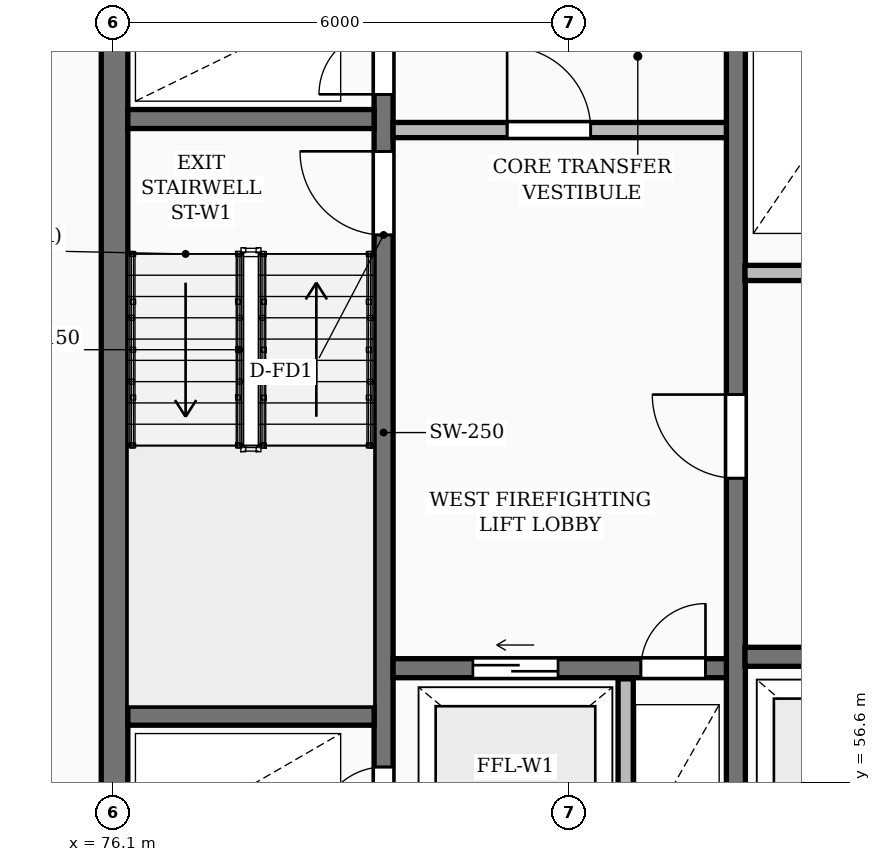
"""IFC4 building model, lengths in metres.
Left out: names, types, materials, properties, quantities, classifications, styles, units other than length and angle.
Written with IfcOpenShell. Run it as: python <this file> out.ifc"""

import sys

from ifc_helpers import new_model, si_unit, direction, frame, frame_2d, origin, place, context, subcontext, project, spatial, rectangle, extrude, element, fill, save


model = new_model("IFC4")
c1 = context("Model", 3, precision=1e-05, world=origin(), true_north=direction((0.0, 1.0)))
c2 = subcontext(c1, "Body", "Model", "MODEL_VIEW")
j1 = project(units=[si_unit("LENGTHUNIT", "METRE"), si_unit("PLANEANGLEUNIT", "RADIAN")], contexts=[c1])
p1 = place(None, origin())
s1 = spatial("IfcSite", under=j1, at=p1, CompositionType="ELEMENT")
p2 = place(p1, origin())
s2 = spatial("IfcBuilding", under=s1, at=p2, CompositionType="ELEMENT")
p3 = place(p2, frame((0.0, 0.0, -7.2)))
s3 = spatial("IfcBuildingStorey", under=s2, at=p3, CompositionType="ELEMENT", Elevation=-7.2)
p4 = place(p3, frame((76.125, 55.375, 0.0), z_axis=(0.0, 0.0, 1.0), x_axis=(0.0, 1.0, 0.0)))
e1 = element("IfcWall", 1, at=p4, inside=s3, PredefinedType="SHEAR", context=c2, shape_type="SweptSolid", body=[
    extrude(rectangle(XDim=11.65, YDim=0.35, at=frame_2d((5.825, 0.0))), origin(), (0.0, 0.0, 1.0), 3.6),
])
p5 = place(p3, frame((79.665, 55.4, 0.0), z_axis=(0.0, 0.0, 1.0), x_axis=(0.0, 1.0, 0.0)))
e2 = element("IfcWall", 2, at=p5, inside=s3, PredefinedType="SHEAR", context=c2, shape_type="SweptSolid", body=[
    extrude(rectangle(XDim=11.6, YDim=0.25, at=frame_2d((5.8, 0.0))), origin(), (0.0, 0.0, 1.0), 3.6),
])
p6 = place(p5, frame((0.55, 0.0, 0.0)))
e3 = element("IfcOpeningElement", 3, at=p6, cuts=e2, PredefinedType="OPENING", context=c2, shape_type="SweptSolid", body=[
    extrude(rectangle(XDim=0.85, YDim=2.05, at=frame_2d((0.425, 1.025))), frame((0.0, 0.135, 0.0), z_axis=(0.0, -1.0, 0.0), x_axis=(1.0, 0.0, 0.0)), (0.0, 0.0, 1.0), 0.27),
])
p7 = place(p5, frame((8.4, 0.0, 0.0)))
e4 = element("IfcOpeningElement", 4, at=p7, cuts=e2, PredefinedType="OPENING", context=c2, shape_type="SweptSolid", body=[
    extrude(rectangle(XDim=1.1, YDim=2.1, at=frame_2d((0.55, 1.05))), frame((0.0, 0.135, 0.0), z_axis=(0.0, -1.0, 0.0), x_axis=(1.0, 0.0, 0.0)), (0.0, 0.0, 1.0), 0.27),
])
p8 = place(p5, frame((10.25, 0.0, 0.0)))
e5 = element("IfcOpeningElement", 5, at=p8, cuts=e2, PredefinedType="OPENING", context=c2, shape_type="SweptSolid", body=[
    extrude(rectangle(XDim=0.85, YDim=2.05, at=frame_2d((0.425, 1.025))), frame((0.0, 0.135, 0.0), z_axis=(0.0, -1.0, 0.0), x_axis=(1.0, 0.0, 0.0)), (0.0, 0.0, 1.0), 0.27),
])
for number, where, z_axis, x_axis in (
    (6, (76.3, 57.475, 0.0), (0.0, 0.0, 1.0), (1.0, 0.0, 0.0)),
    (7, (76.3, 65.325, 0.0), (0.0, 0.0, 1.0), (1.0, 0.0, 0.0)),
):
    element("IfcWall", number, at=place(p3, frame(where, z_axis=z_axis, x_axis=x_axis)), inside=s3, PredefinedType="SHEAR", context=c2, shape_type="SweptSolid", body=[
        extrude(rectangle(XDim=3.24, YDim=0.25, at=frame_2d((1.62, 0.0))), origin(), (0.0, 0.0, 1.0), 3.6),
    ])
p9 = place(p3, frame((79.79, 58.1, 0.0), z_axis=(0.0, 0.0, 1.0), x_axis=(1.0, 0.0, 0.0)))
e8 = element("IfcWall", 8, at=p9, inside=s3, PredefinedType="SHEAR", context=c2, shape_type="SweptSolid", body=[
    extrude(rectangle(XDim=4.39, YDim=0.25, at=frame_2d((2.195, 0.0))), origin(), (0.0, 0.0, 1.0), 3.6),
])
p10 = place(p9, frame((1.05, 0.0, 0.0)))
e9 = element("IfcOpeningElement", 9, at=p10, cuts=e8, PredefinedType="OPENING", context=c2, shape_type="SweptSolid", body=[
    extrude(rectangle(XDim=1.12, YDim=2.12, at=frame_2d((0.56, 1.06))), frame((0.0, 0.135, 0.0), z_axis=(0.0, -1.0, 0.0), x_axis=(1.0, 0.0, 0.0)), (0.0, 0.0, 1.0), 0.27),
])
p11 = place(p9, frame((3.26, 0.0, 0.0)))
e10 = element("IfcOpeningElement", 10, at=p11, cuts=e8, PredefinedType="OPENING", context=c2, shape_type="SweptSolid", body=[
    extrude(rectangle(XDim=0.85, YDim=2.05, at=frame_2d((0.425, 1.025))), frame((0.0, 0.135, 0.0), z_axis=(0.0, -1.0, 0.0), x_axis=(1.0, 0.0, 0.0)), (0.0, 0.0, 1.0), 0.27),
])
p12 = place(p3, frame((82.85, 55.4, 0.0), z_axis=(0.0, 0.0, 1.0), x_axis=(0.0, 1.0, 0.0)))
e11 = element("IfcWall", 11, at=p12, inside=s3, PredefinedType="PARTITIONING", context=c2, shape_type="SweptSolid", body=[
    extrude(rectangle(XDim=2.56, YDim=0.2, at=frame_2d((1.28, 0.0))), origin(), (0.0, 0.0, 1.0), 3.3),
])
p13 = place(p3, frame((79.79, 65.18, 0.0), z_axis=(0.0, 0.0, 1.0), x_axis=(1.0, 0.0, 0.0)))
e12 = element("IfcWall", 12, at=p13, inside=s3, PredefinedType="PARTITIONING", context=c2, shape_type="SweptSolid", body=[
    extrude(rectangle(XDim=4.39, YDim=0.2, at=frame_2d((2.195, 0.0))), origin(), (0.0, 0.0, 1.0), 3.3),
])
p14 = place(p13, frame((1.5, 0.0, 0.0)))
e13 = element("IfcOpeningElement", 13, at=p14, cuts=e12, PredefinedType="OPENING", context=c2, shape_type="SweptSolid", body=[
    extrude(rectangle(XDim=1.1, YDim=2.1, at=frame_2d((0.55, 1.05))), frame((0.0, 0.11, 0.0), z_axis=(0.0, -1.0, 0.0), x_axis=(1.0, 0.0, 0.0)), (0.0, 0.0, 1.0), 0.22),
])
p15 = place(p3, frame((84.3, 55.4, 0.0), z_axis=(0.0, 0.0, 1.0), x_axis=(0.0, 1.0, 0.0)))
e14 = element("IfcWall", 14, at=p15, inside=s3, PredefinedType="SHEAR", context=c2, shape_type="SweptSolid", body=[
    extrude(rectangle(XDim=11.6, YDim=0.25, at=frame_2d((5.8, 0.0))), origin(), (0.0, 0.0, 1.0), 3.6),
])
p16 = place(p15, frame((5.2, 0.0, 0.0)))
e15 = element("IfcOpeningElement", 15, at=p16, cuts=e14, PredefinedType="OPENING", context=c2, shape_type="SweptSolid", body=[
    extrude(rectangle(XDim=1.1, YDim=2.1, at=frame_2d((0.55, 1.05))), frame((0.0, 0.135, 0.0), z_axis=(0.0, -1.0, 0.0), x_axis=(1.0, 0.0, 0.0)), (0.0, 0.0, 1.0), 0.27),
])
p17 = place(p3, frame((84.42, 58.25, 0.0), z_axis=(0.0, 0.0, 1.0), x_axis=(1.0, 0.0, 0.0)))
e16 = element("IfcWall", 16, at=p17, inside=s3, PredefinedType="SHEAR", context=c2, shape_type="SweptSolid", body=[
    extrude(rectangle(XDim=8.36, YDim=0.25, at=frame_2d((4.18, 0.0))), origin(), (0.0, 0.0, 1.0), 3.6),
])
p18 = place(p17, frame((0.82, 0.0, 0.0)))
e17 = element("IfcOpeningElement", 17, at=p18, cuts=e16, PredefinedType="OPENING", context=c2, shape_type="SweptSolid", body=[
    extrude(rectangle(XDim=1.12, YDim=2.12, at=frame_2d((0.56, 1.06))), frame((0.0, 0.135, 0.0), z_axis=(0.0, -1.0, 0.0), x_axis=(1.0, 0.0, 0.0)), (0.0, 0.0, 1.0), 0.27),
])
p19 = place(p17, frame((3.62, 0.0, 0.0)))
e18 = element("IfcOpeningElement", 18, at=p19, cuts=e16, PredefinedType="OPENING", context=c2, shape_type="SweptSolid", body=[
    extrude(rectangle(XDim=1.12, YDim=2.12, at=frame_2d((0.56, 1.06))), frame((0.0, 0.135, 0.0), z_axis=(0.0, -1.0, 0.0), x_axis=(1.0, 0.0, 0.0)), (0.0, 0.0, 1.0), 0.27),
])
p20 = place(p17, frame((6.42, 0.0, 0.0)))
e19 = element("IfcOpeningElement", 19, at=p20, cuts=e16, PredefinedType="OPENING", context=c2, shape_type="SweptSolid", body=[
    extrude(rectangle(XDim=1.12, YDim=2.12, at=frame_2d((0.56, 1.06))), frame((0.0, 0.135, 0.0), z_axis=(0.0, -1.0, 0.0), x_axis=(1.0, 0.0, 0.0)), (0.0, 0.0, 1.0), 0.27),
])
p21 = place(p3, frame((84.42, 63.3, 0.0), z_axis=(0.0, 0.0, 1.0), x_axis=(1.0, 0.0, 0.0)))
e20 = element("IfcWall", 20, at=p21, inside=s3, PredefinedType="PARTITIONING", context=c2, shape_type="SweptSolid", body=[
    extrude(rectangle(XDim=19.83, YDim=0.2, at=frame_2d((9.915, 0.0))), origin(), (0.0, 0.0, 1.0), 3.3),
])
p22 = place(p21, frame((1.15, 0.0, 0.0)))
e21 = element("IfcOpeningElement", 21, at=p22, cuts=e20, PredefinedType="OPENING", context=c2, shape_type="SweptSolid", body=[
    extrude(rectangle(XDim=0.85, YDim=2.05, at=frame_2d((0.425, 1.025))), frame((0.0, 0.11, 0.0), z_axis=(0.0, -1.0, 0.0), x_axis=(1.0, 0.0, 0.0)), (0.0, 0.0, 1.0), 0.22),
])
p23 = place(p21, frame((3.25, 0.0, 0.0)))
e22 = element("IfcOpeningElement", 22, at=p23, cuts=e20, PredefinedType="OPENING", context=c2, shape_type="SweptSolid", body=[
    extrude(rectangle(XDim=0.85, YDim=2.05, at=frame_2d((0.425, 1.025))), frame((0.0, 0.11, 0.0), z_axis=(0.0, -1.0, 0.0), x_axis=(1.0, 0.0, 0.0)), (0.0, 0.0, 1.0), 0.22),
])
p24 = place(p21, frame((13.08, 0.0, 0.0)))
e23 = element("IfcOpeningElement", 23, at=p24, cuts=e20, PredefinedType="OPENING", context=c2, shape_type="SweptSolid", body=[
    extrude(rectangle(XDim=1.5, YDim=2.2, at=frame_2d((0.75, 1.1))), frame((0.0, 0.11, 0.0), z_axis=(0.0, -1.0, 0.0), x_axis=(1.0, 0.0, 0.0)), (0.0, 0.0, 1.0), 0.22),
])
p25 = place(p21, frame((5.53, 0.0, 0.0)))
e24 = element("IfcOpeningElement", 24, at=p25, cuts=e20, PredefinedType="OPENING", context=c2, shape_type="SweptSolid", body=[
    extrude(rectangle(XDim=0.88, YDim=2.06, at=frame_2d((0.44, 1.03))), frame((0.0, 0.11, 0.0), z_axis=(0.0, -1.0, 0.0), x_axis=(1.0, 0.0, 0.0)), (0.0, 0.0, 1.0), 0.22),
])
p26 = place(p21, frame((7.68, 0.0, 0.0)))
e25 = element("IfcOpeningElement", 25, at=p26, cuts=e20, PredefinedType="OPENING", context=c2, shape_type="SweptSolid", body=[
    extrude(rectangle(XDim=0.88, YDim=2.06, at=frame_2d((0.44, 1.03))), frame((0.0, 0.11, 0.0), z_axis=(0.0, -1.0, 0.0), x_axis=(1.0, 0.0, 0.0)), (0.0, 0.0, 1.0), 0.22),
])
p27 = place(p21, frame((10.43, 0.0, 0.0)))
e26 = element("IfcOpeningElement", 26, at=p27, cuts=e20, PredefinedType="OPENING", context=c2, shape_type="SweptSolid", body=[
    extrude(rectangle(XDim=0.85, YDim=2.05, at=frame_2d((0.425, 1.025))), frame((0.0, 0.11, 0.0), z_axis=(0.0, -1.0, 0.0), x_axis=(1.0, 0.0, 0.0)), (0.0, 0.0, 1.0), 0.22),
])
p28 = place(p21, frame((16.23, 0.0, 0.0)))
e27 = element("IfcOpeningElement", 27, at=p28, cuts=e20, PredefinedType="OPENING", context=c2, shape_type="SweptSolid", body=[
    extrude(rectangle(XDim=0.96, YDim=2.1, at=frame_2d((0.48, 1.05))), frame((0.0, 0.11, 0.0), z_axis=(0.0, -1.0, 0.0), x_axis=(1.0, 0.0, 0.0)), (0.0, 0.0, 1.0), 0.22),
])
p29 = place(p21, frame((18.68, 0.0, 0.0)))
e28 = element("IfcOpeningElement", 28, at=p29, cuts=e20, PredefinedType="OPENING", context=c2, shape_type="SweptSolid", body=[
    extrude(rectangle(XDim=0.84, YDim=2.04, at=frame_2d((0.42, 1.02))), frame((0.0, 0.11, 0.0), z_axis=(0.0, -1.0, 0.0), x_axis=(1.0, 0.0, 0.0)), (0.0, 0.0, 1.0), 0.22),
])
p30 = place(p6, origin())
e29 = element("IfcDoor", 29, at=p30, inside=s3, OperationType="SINGLE_SWING_LEFT", PredefinedType="DOOR", context=c2, shape_type="SweptSolid", body=[
    extrude(rectangle(XDim=0.85, YDim=2.05, at=frame_2d((0.425, 1.025))), frame((0.0, 0.025, 0.0), z_axis=(0.0, -1.0, 0.0), x_axis=(1.0, 0.0, 0.0)), (0.0, 0.0, 1.0), 0.05),
])
fill(e3, e29)
p31 = place(p7, origin())
e30 = element("IfcDoor", 30, at=p31, inside=s3, OperationType="SINGLE_SWING_RIGHT", PredefinedType="DOOR", context=c2, shape_type="SweptSolid", body=[
    extrude(rectangle(XDim=1.1, YDim=2.1, at=frame_2d((0.55, 1.05))), frame((0.0, 0.025, 0.0), z_axis=(0.0, -1.0, 0.0), x_axis=(1.0, 0.0, 0.0)), (0.0, 0.0, 1.0), 0.05),
])
fill(e4, e30)
p32 = place(p8, origin())
e31 = element("IfcDoor", 31, at=p32, inside=s3, OperationType="SINGLE_SWING_LEFT", PredefinedType="DOOR", context=c2, shape_type="SweptSolid", body=[
    extrude(rectangle(XDim=0.85, YDim=2.05, at=frame_2d((0.425, 1.025))), frame((0.0, 0.025, 0.0), z_axis=(0.0, -1.0, 0.0), x_axis=(1.0, 0.0, 0.0)), (0.0, 0.0, 1.0), 0.05),
])
fill(e5, e31)
p33 = place(p10, origin())
e32 = element("IfcDoor", 32, at=p33, inside=s3, OperationType="SLIDING_TO_LEFT", PredefinedType="DOOR", context=c2, shape_type="SweptSolid", body=[
    extrude(rectangle(XDim=1.12, YDim=2.12, at=frame_2d((0.56, 1.06))), frame((0.0, 0.025, 0.0), z_axis=(0.0, -1.0, 0.0), x_axis=(1.0, 0.0, 0.0)), (0.0, 0.0, 1.0), 0.05),
])
fill(e9, e32)
p34 = place(p11, origin())
e33 = element("IfcDoor", 33, at=p34, inside=s3, OperationType="SINGLE_SWING_RIGHT", PredefinedType="DOOR", context=c2, shape_type="SweptSolid", body=[
    extrude(rectangle(XDim=0.85, YDim=2.05, at=frame_2d((0.425, 1.025))), frame((0.0, 0.025, 0.0), z_axis=(0.0, -1.0, 0.0), x_axis=(1.0, 0.0, 0.0)), (0.0, 0.0, 1.0), 0.05),
])
fill(e10, e33)
p35 = place(p14, origin())
e34 = element("IfcDoor", 34, at=p35, inside=s3, OperationType="SINGLE_SWING_LEFT", PredefinedType="DOOR", context=c2, shape_type="SweptSolid", body=[
    extrude(rectangle(XDim=1.1, YDim=2.1, at=frame_2d((0.55, 1.05))), frame((0.0, 0.025, 0.0), z_axis=(0.0, -1.0, 0.0), x_axis=(1.0, 0.0, 0.0)), (0.0, 0.0, 1.0), 0.05),
])
fill(e13, e34)
p36 = place(p16, origin())
e35 = element("IfcDoor", 35, at=p36, inside=s3, OperationType="SINGLE_SWING_RIGHT", PredefinedType="DOOR", context=c2, shape_type="SweptSolid", body=[
    extrude(rectangle(XDim=1.1, YDim=2.1, at=frame_2d((0.55, 1.05))), frame((0.0, 0.025, 0.0), z_axis=(0.0, -1.0, 0.0), x_axis=(1.0, 0.0, 0.0)), (0.0, 0.0, 1.0), 0.05),
])
fill(e15, e35)
save(model, sys.argv[1])
